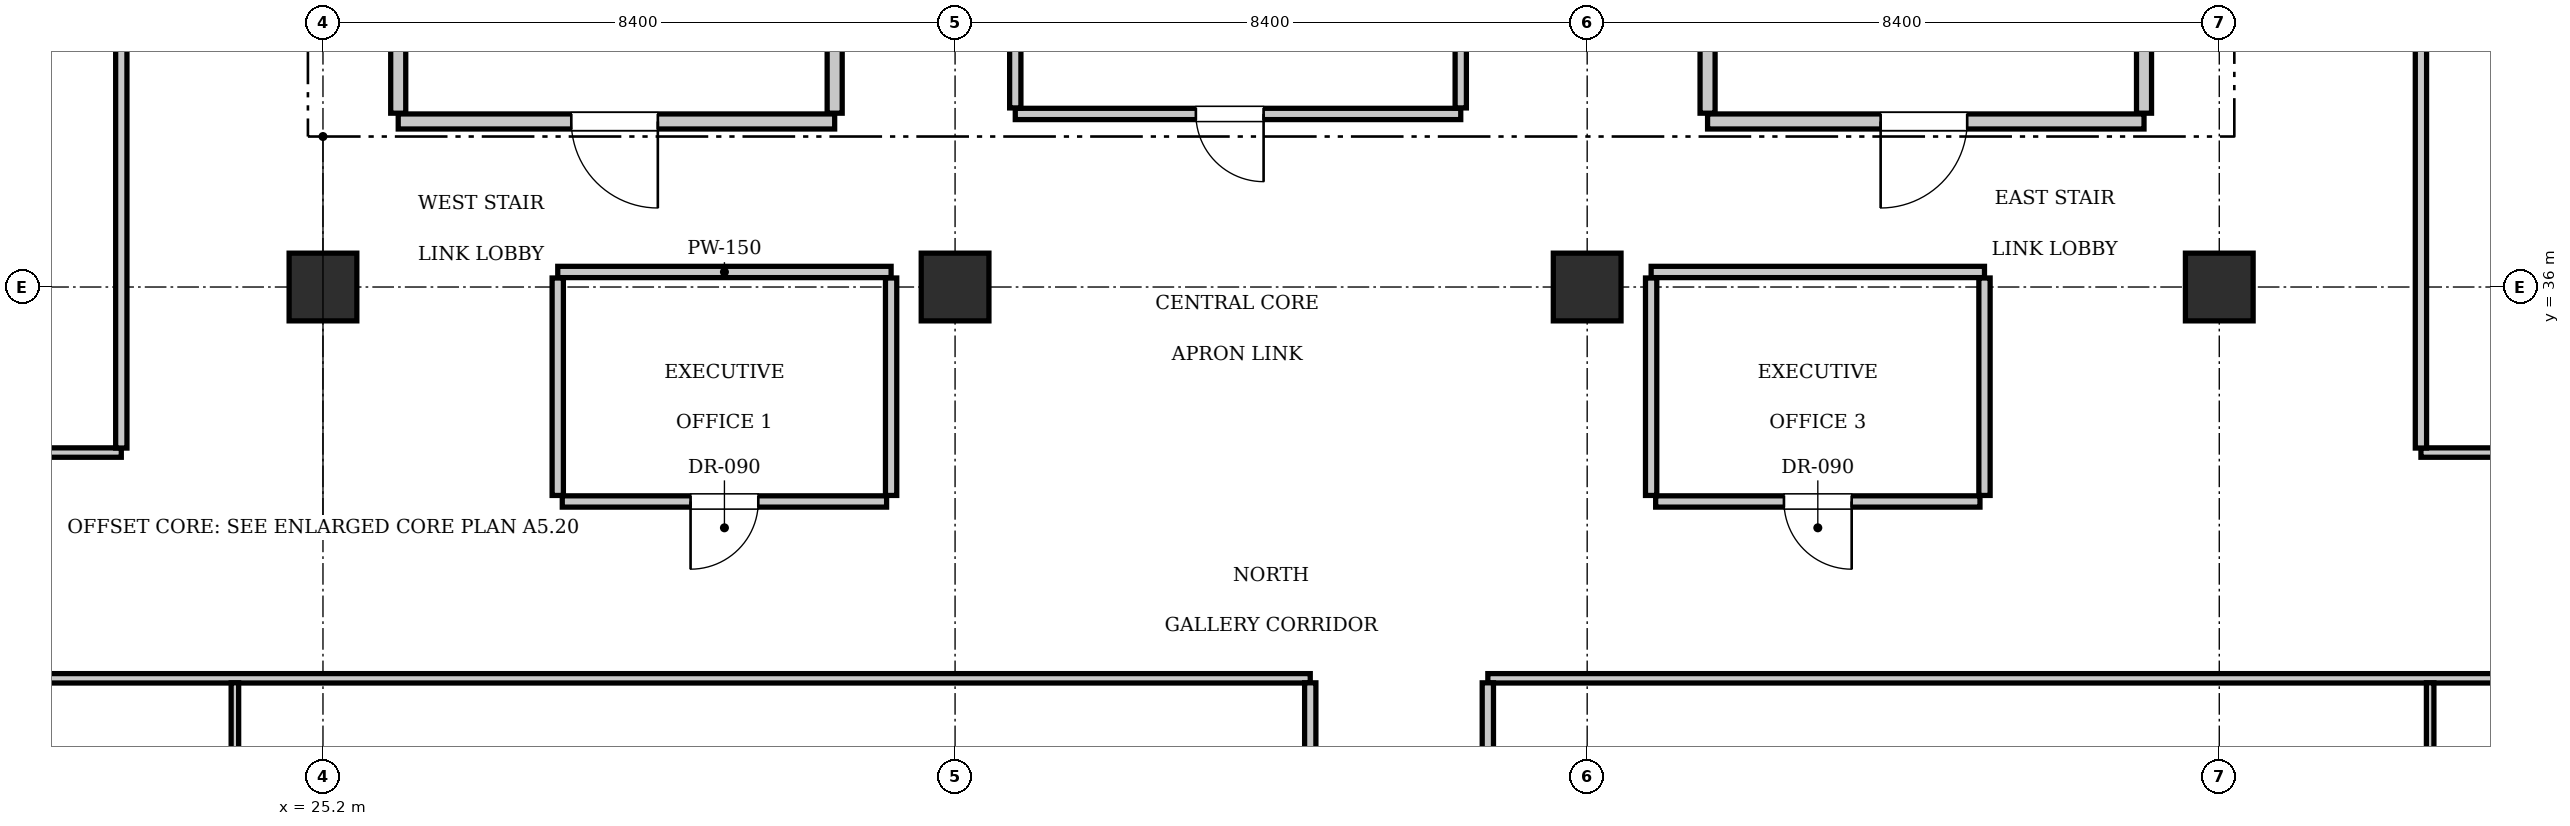
"""IFC4 building model, lengths in metres.
Left out: names, types, materials, properties, quantities, classifications, styles, units other than length and angle.
Written with IfcOpenShell. Run it as: python <this file> out.ifc"""

import sys

from ifc_helpers import new_model, si_unit, direction, frame, frame_2d, origin, origin_2d, place, context, subcontext, project, spatial, rectangle, extrude, element, fill, save


model = new_model("IFC4")
c1 = context("Model", 3, precision=1e-05, world=origin(), true_north=direction((0.0, 1.0)))
c2 = subcontext(c1, "Body", "Model", "MODEL_VIEW")
j1 = project(units=[si_unit("LENGTHUNIT", "METRE"), si_unit("PLANEANGLEUNIT", "RADIAN")], contexts=[c1])
p1 = place(None, origin())
s1 = spatial("IfcSite", under=j1, at=p1, CompositionType="ELEMENT")
p2 = place(p1, origin())
s2 = spatial("IfcBuilding", under=s1, at=p2, CompositionType="ELEMENT")
p3 = place(p2, frame((0.0, 0.0, 196.7)))
s3 = spatial("IfcBuildingStorey", under=s2, at=p3, CompositionType="ELEMENT", Elevation=196.7)
for number, where, z_axis, x_axis in (
    (1, (25.2, 36.0, 0.0), (0.0, 0.0, 1.0), (1.0, 0.0, 0.0)),
    (2, (33.6, 36.0, 0.0), (0.0, 0.0, 1.0), (1.0, 0.0, 0.0)),
    (3, (42.0, 36.0, 0.0), (0.0, 0.0, 1.0), (1.0, 0.0, 0.0)),
    (4, (50.4, 36.0, 0.0), (0.0, 0.0, 1.0), (1.0, 0.0, 0.0)),
):
    element("IfcColumn", number, at=place(p3, frame(where, z_axis=z_axis, x_axis=x_axis)), inside=s3, PredefinedType="COLUMN", context=c2, shape_type="SweptSolid", body=[
        extrude(rectangle(XDim=0.9, YDim=0.9, at=origin_2d()), origin(), (0.0, 0.0, 1.0), 3.85),
    ])
p4 = place(p3, frame((26.2, 38.2, 0.0), z_axis=(0.0, 0.0, 1.0), x_axis=(1.0, 0.0, 0.0)))
e5 = element("IfcWall", 5, at=p4, inside=s3, PredefinedType="PARTITIONING", context=c2, shape_type="SweptSolid", body=[
    extrude(rectangle(XDim=5.8, YDim=0.2, at=frame_2d((2.9, 0.0))), origin(), (0.0, 0.0, 1.0), 3.61),
])
p5 = place(p4, frame((2.3, 0.0, 0.0)))
e6 = element("IfcOpeningElement", 6, at=p5, cuts=e5, PredefinedType="OPENING", context=c2, shape_type="SweptSolid", body=[
    extrude(rectangle(XDim=1.15, YDim=2.15, at=frame_2d((0.575, 1.075))), frame((0.0, 0.11, 0.0), z_axis=(0.0, -1.0, 0.0), x_axis=(1.0, 0.0, 0.0)), (0.0, 0.0, 1.0), 0.22),
])
for number, where, z_axis, x_axis in (
    (7, (26.2, 38.31, 0.0), (0.0, 0.0, 1.0), (0.0, 1.0, 0.0)),
    (8, (32.0, 38.31, 0.0), (0.0, 0.0, 1.0), (0.0, 1.0, 0.0)),
):
    element("IfcWall", number, at=place(p3, frame(where, z_axis=z_axis, x_axis=x_axis)), inside=s3, PredefinedType="PARTITIONING", context=c2, shape_type="SweptSolid", body=[
        extrude(rectangle(XDim=3.07, YDim=0.2, at=frame_2d((1.535, 0.0))), origin(), (0.0, 0.0, 1.0), 3.61),
    ])
p6 = place(p3, frame((43.6, 38.2, 0.0), z_axis=(0.0, 0.0, 1.0), x_axis=(1.0, 0.0, 0.0)))
e9 = element("IfcWall", 9, at=p6, inside=s3, PredefinedType="PARTITIONING", context=c2, shape_type="SweptSolid", body=[
    extrude(rectangle(XDim=5.8, YDim=0.2, at=frame_2d((2.9, 0.0))), origin(), (0.0, 0.0, 1.0), 3.61),
])
p7 = place(p6, frame((2.3, 0.0, 0.0)))
e10 = element("IfcOpeningElement", 10, at=p7, cuts=e9, PredefinedType="OPENING", context=c2, shape_type="SweptSolid", body=[
    extrude(rectangle(XDim=1.15, YDim=2.15, at=frame_2d((0.575, 1.075))), frame((0.0, 0.11, 0.0), z_axis=(0.0, -1.0, 0.0), x_axis=(1.0, 0.0, 0.0)), (0.0, 0.0, 1.0), 0.22),
])
for number, where, z_axis, x_axis in (
    (11, (43.6, 38.31, 0.0), (0.0, 0.0, 1.0), (0.0, 1.0, 0.0)),
    (12, (49.4, 38.31, 0.0), (0.0, 0.0, 1.0), (0.0, 1.0, 0.0)),
):
    element("IfcWall", number, at=place(p3, frame(where, z_axis=z_axis, x_axis=x_axis)), inside=s3, PredefinedType="PARTITIONING", context=c2, shape_type="SweptSolid", body=[
        extrude(rectangle(XDim=3.07, YDim=0.2, at=frame_2d((1.535, 0.0))), origin(), (0.0, 0.0, 1.0), 3.61),
    ])
p8 = place(p3, frame((34.4, 38.3, 0.0), z_axis=(0.0, 0.0, 1.0), x_axis=(1.0, 0.0, 0.0)))
e13 = element("IfcWall", 13, at=p8, inside=s3, PredefinedType="PARTITIONING", context=c2, shape_type="SweptSolid", body=[
    extrude(rectangle(XDim=5.92, YDim=0.15, at=frame_2d((2.96, 0.0))), origin(), (0.0, 0.0, 1.0), 3.61),
])
p9 = place(p8, frame((2.4, 0.0, 0.0)))
e14 = element("IfcOpeningElement", 14, at=p9, cuts=e13, PredefinedType="OPENING", context=c2, shape_type="SweptSolid", body=[
    extrude(rectangle(XDim=0.9, YDim=2.1, at=frame_2d((0.45, 1.05))), frame((0.0, 0.085, 0.0), z_axis=(0.0, -1.0, 0.0), x_axis=(1.0, 0.0, 0.0)), (0.0, 0.0, 1.0), 0.17),
])
for number, where, z_axis, x_axis in (
    (15, (34.4, 38.38, 0.0), (0.0, 0.0, 1.0), (0.0, 1.0, 0.0)),
    (16, (40.32, 38.38, 0.0), (0.0, 0.0, 1.0), (0.0, 1.0, 0.0)),
):
    element("IfcWall", number, at=place(p3, frame(where, z_axis=z_axis, x_axis=x_axis)), inside=s3, PredefinedType="PARTITIONING", context=c2, shape_type="SweptSolid", body=[
        extrude(rectangle(XDim=2.84, YDim=0.15, at=frame_2d((1.42, 0.0))), origin(), (0.0, 0.0, 1.0), 3.61),
    ])
p10 = place(p3, frame((28.32, 36.2, 0.0), z_axis=(0.0, 0.0, 1.0), x_axis=(1.0, 0.0, 0.0)))
e17 = element("IfcWall", 17, at=p10, inside=s3, PredefinedType="PARTITIONING", context=c2, shape_type="SweptSolid", body=[
    extrude(rectangle(XDim=4.43, YDim=0.15, at=frame_2d((2.215, 0.0))), origin(), (0.0, 0.0, 1.0), 3.61),
])
for number, where, z_axis, x_axis in (
    (18, (28.32, 33.23, 0.0), (0.0, 0.0, 1.0), (0.0, 1.0, 0.0)),
    (19, (32.75, 33.23, 0.0), (0.0, 0.0, 1.0), (0.0, 1.0, 0.0)),
):
    element("IfcWall", number, at=place(p3, frame(where, z_axis=z_axis, x_axis=x_axis)), inside=s3, PredefinedType="PARTITIONING", context=c2, shape_type="SweptSolid", body=[
        extrude(rectangle(XDim=2.89, YDim=0.15, at=frame_2d((1.445, 0.0))), origin(), (0.0, 0.0, 1.0), 3.61),
    ])
p11 = place(p3, frame((28.38, 33.15, 0.0), z_axis=(0.0, 0.0, 1.0), x_axis=(1.0, 0.0, 0.0)))
e20 = element("IfcWall", 20, at=p11, inside=s3, PredefinedType="PARTITIONING", context=c2, shape_type="SweptSolid", body=[
    extrude(rectangle(XDim=4.31, YDim=0.15, at=frame_2d((2.155, 0.0))), origin(), (0.0, 0.0, 1.0), 3.61),
])
p12 = place(p11, frame((1.705, 0.0, 0.0)))
e21 = element("IfcOpeningElement", 21, at=p12, cuts=e20, PredefinedType="OPENING", context=c2, shape_type="SweptSolid", body=[
    extrude(rectangle(XDim=0.9, YDim=2.1, at=frame_2d((0.45, 1.05))), frame((0.0, 0.085, 0.0), z_axis=(0.0, -1.0, 0.0), x_axis=(1.0, 0.0, 0.0)), (0.0, 0.0, 1.0), 0.17),
])
p13 = place(p3, frame((42.85, 36.2, 0.0), z_axis=(0.0, 0.0, 1.0), x_axis=(1.0, 0.0, 0.0)))
e22 = element("IfcWall", 22, at=p13, inside=s3, PredefinedType="PARTITIONING", context=c2, shape_type="SweptSolid", body=[
    extrude(rectangle(XDim=4.43, YDim=0.15, at=frame_2d((2.215, 0.0))), origin(), (0.0, 0.0, 1.0), 3.61),
])
for number, where, z_axis, x_axis in (
    (23, (42.85, 33.23, 0.0), (0.0, 0.0, 1.0), (0.0, 1.0, 0.0)),
    (24, (47.28, 33.23, 0.0), (0.0, 0.0, 1.0), (0.0, 1.0, 0.0)),
):
    element("IfcWall", number, at=place(p3, frame(where, z_axis=z_axis, x_axis=x_axis)), inside=s3, PredefinedType="PARTITIONING", context=c2, shape_type="SweptSolid", body=[
        extrude(rectangle(XDim=2.89, YDim=0.15, at=frame_2d((1.445, 0.0))), origin(), (0.0, 0.0, 1.0), 3.61),
    ])
p14 = place(p3, frame((42.91, 33.15, 0.0), z_axis=(0.0, 0.0, 1.0), x_axis=(1.0, 0.0, 0.0)))
e25 = element("IfcWall", 25, at=p14, inside=s3, PredefinedType="PARTITIONING", context=c2, shape_type="SweptSolid", body=[
    extrude(rectangle(XDim=4.31, YDim=0.15, at=frame_2d((2.155, 0.0))), origin(), (0.0, 0.0, 1.0), 3.61),
])
p15 = place(p14, frame((1.705, 0.0, 0.0)))
e26 = element("IfcOpeningElement", 26, at=p15, cuts=e25, PredefinedType="OPENING", context=c2, shape_type="SweptSolid", body=[
    extrude(rectangle(XDim=0.9, YDim=2.1, at=frame_2d((0.45, 1.05))), frame((0.0, 0.085, 0.0), z_axis=(0.0, -1.0, 0.0), x_axis=(1.0, 0.0, 0.0)), (0.0, 0.0, 1.0), 0.17),
])
p16 = place(p3, frame((13.2, 30.8, 0.0), z_axis=(0.0, 0.0, 1.0), x_axis=(1.0, 0.0, 0.0)))
e27 = element("IfcWall", 27, at=p16, inside=s3, PredefinedType="PARTITIONING", context=c2, shape_type="SweptSolid", body=[
    extrude(rectangle(XDim=25.12, YDim=0.125, at=frame_2d((12.56, 0.0))), origin(), (0.0, 0.0, 1.0), 3.61),
])
p17 = place(p3, frame((40.68, 30.8, 0.0), z_axis=(0.0, 0.0, 1.0), x_axis=(1.0, 0.0, 0.0)))
e28 = element("IfcWall", 28, at=p17, inside=s3, PredefinedType="PARTITIONING", context=c2, shape_type="SweptSolid", body=[
    extrude(rectangle(XDim=21.72, YDim=0.125, at=frame_2d((10.86, 0.0))), origin(), (0.0, 0.0, 1.0), 3.61),
])
p18 = place(p3, frame((38.32, 25.6, 0.0), z_axis=(0.0, 0.0, 1.0), x_axis=(0.0, 1.0, 0.0)))
e29 = element("IfcWall", 29, at=p18, inside=s3, PredefinedType="PARTITIONING", context=c2, shape_type="SweptSolid", body=[
    extrude(rectangle(XDim=5.14, YDim=0.15, at=frame_2d((2.57, 0.0))), origin(), (0.0, 0.0, 1.0), 3.61),
])
p19 = place(p18, frame((2.095, 0.0, 0.0)))
e30 = element("IfcOpeningElement", 30, at=p19, cuts=e29, PredefinedType="OPENING", context=c2, shape_type="SweptSolid", body=[
    extrude(rectangle(XDim=0.95, YDim=2.15, at=frame_2d((0.475, 1.075))), frame((0.0, 0.085, 0.0), z_axis=(0.0, -1.0, 0.0), x_axis=(1.0, 0.0, 0.0)), (0.0, 0.0, 1.0), 0.17),
])
p20 = place(p3, frame((24.03, 23.31, 0.0), z_axis=(0.0, 0.0, 1.0), x_axis=(0.0, 1.0, 0.0)))
e31 = element("IfcWall", 31, at=p20, inside=s3, PredefinedType="PARTITIONING", context=c2, shape_type="SweptSolid", body=[
    extrude(rectangle(XDim=7.43, YDim=0.1, at=frame_2d((3.715, 0.0))), origin(), (0.0, 0.0, 1.0), 3.61),
])
p21 = place(p20, frame((4.945, 0.0, 0.0)))
e32 = element("IfcOpeningElement", 32, at=p21, cuts=e31, PredefinedType="OPENING", context=c2, shape_type="SweptSolid", body=[
    extrude(rectangle(XDim=0.9, YDim=2.1, at=frame_2d((0.45, 1.05))), frame((0.0, 0.06, 0.0), z_axis=(0.0, -1.0, 0.0), x_axis=(1.0, 0.0, 0.0)), (0.0, 0.0, 1.0), 0.12),
])
p22 = place(p3, frame((40.68, 25.6, 0.0), z_axis=(0.0, 0.0, 1.0), x_axis=(0.0, 1.0, 0.0)))
e33 = element("IfcWall", 33, at=p22, inside=s3, PredefinedType="PARTITIONING", context=c2, shape_type="SweptSolid", body=[
    extrude(rectangle(XDim=5.14, YDim=0.15, at=frame_2d((2.57, 0.0))), origin(), (0.0, 0.0, 1.0), 3.61),
])
p23 = place(p22, frame((2.095, 0.0, 0.0)))
e34 = element("IfcOpeningElement", 34, at=p23, cuts=e33, PredefinedType="OPENING", context=c2, shape_type="SweptSolid", body=[
    extrude(rectangle(XDim=0.95, YDim=2.15, at=frame_2d((0.475, 1.075))), frame((0.0, 0.085, 0.0), z_axis=(0.0, -1.0, 0.0), x_axis=(1.0, 0.0, 0.0)), (0.0, 0.0, 1.0), 0.17),
])
p24 = place(p3, frame((53.202, 23.31, 0.0), z_axis=(0.0, 0.0, 1.0), x_axis=(0.0, 1.0, 0.0)))
e35 = element("IfcWall", 35, at=p24, inside=s3, PredefinedType="PARTITIONING", context=c2, shape_type="SweptSolid", body=[
    extrude(rectangle(XDim=7.43, YDim=0.1, at=frame_2d((3.715, 0.0))), origin(), (0.0, 0.0, 1.0), 3.61),
])
p25 = place(p24, frame((3.265, 0.0, 0.0)))
e36 = element("IfcOpeningElement", 36, at=p25, cuts=e35, PredefinedType="OPENING", context=c2, shape_type="SweptSolid", body=[
    extrude(rectangle(XDim=0.9, YDim=2.1, at=frame_2d((0.45, 1.05))), frame((0.0, 0.06, 0.0), z_axis=(0.0, -1.0, 0.0), x_axis=(1.0, 0.0, 0.0)), (0.0, 0.0, 1.0), 0.12),
])
p26 = place(p3, frame((13.2, 33.8, 0.0), z_axis=(0.0, 0.0, 1.0), x_axis=(1.0, 0.0, 0.0)))
e37 = element("IfcWall", 37, at=p26, inside=s3, PredefinedType="PARTITIONING", context=c2, shape_type="SweptSolid", body=[
    extrude(rectangle(XDim=9.32, YDim=0.125, at=frame_2d((4.66, 0.0))), origin(), (0.0, 0.0, 1.0), 3.61),
])
p27 = place(p3, frame((53.08, 33.8, 0.0), z_axis=(0.0, 0.0, 1.0), x_axis=(1.0, 0.0, 0.0)))
e38 = element("IfcWall", 38, at=p27, inside=s3, PredefinedType="PARTITIONING", context=c2, shape_type="SweptSolid", body=[
    extrude(rectangle(XDim=9.32, YDim=0.125, at=frame_2d((4.66, 0.0))), origin(), (0.0, 0.0, 1.0), 3.61),
])
p28 = place(p3, frame((22.52, 33.86, 0.0), z_axis=(0.0, 0.0, 1.0), x_axis=(0.0, 1.0, 0.0)))
e39 = element("IfcWall", 39, at=p28, inside=s3, PredefinedType="PARTITIONING", context=c2, shape_type="SweptSolid", body=[
    extrude(rectangle(XDim=13.327, YDim=0.15, at=frame_2d((6.664, 0.0))), origin(), (0.0, 0.0, 1.0), 3.61),
])
p29 = place(p28, frame((6.189, 0.0, 0.0)))
e40 = element("IfcOpeningElement", 40, at=p29, cuts=e39, PredefinedType="OPENING", context=c2, shape_type="SweptSolid", body=[
    extrude(rectangle(XDim=0.95, YDim=2.15, at=frame_2d((0.475, 1.075))), frame((0.0, 0.085, 0.0), z_axis=(0.0, -1.0, 0.0), x_axis=(1.0, 0.0, 0.0)), (0.0, 0.0, 1.0), 0.17),
])
p30 = place(p3, frame((53.08, 33.86, 0.0), z_axis=(0.0, 0.0, 1.0), x_axis=(0.0, 1.0, 0.0)))
e41 = element("IfcWall", 41, at=p30, inside=s3, PredefinedType="PARTITIONING", context=c2, shape_type="SweptSolid", body=[
    extrude(rectangle(XDim=13.327, YDim=0.15, at=frame_2d((6.664, 0.0))), origin(), (0.0, 0.0, 1.0), 3.61),
])
p31 = place(p30, frame((6.189, 0.0, 0.0)))
e42 = element("IfcOpeningElement", 42, at=p31, cuts=e41, PredefinedType="OPENING", context=c2, shape_type="SweptSolid", body=[
    extrude(rectangle(XDim=0.95, YDim=2.15, at=frame_2d((0.475, 1.075))), frame((0.0, 0.085, 0.0), z_axis=(0.0, -1.0, 0.0), x_axis=(1.0, 0.0, 0.0)), (0.0, 0.0, 1.0), 0.17),
])
p32 = place(p5, frame((1.15, 0.0, 0.0), z_axis=(0.0, 0.0, 1.0), x_axis=(-1.0, 0.0, 0.0)))
e43 = element("IfcDoor", 43, at=p32, inside=s3, OperationType="SINGLE_SWING_LEFT", PredefinedType="DOOR", context=c2, shape_type="SweptSolid", body=[
    extrude(rectangle(XDim=1.15, YDim=2.15, at=frame_2d((0.575, 1.075))), frame((0.0, 0.025, 0.0), z_axis=(0.0, -1.0, 0.0), x_axis=(1.0, 0.0, 0.0)), (0.0, 0.0, 1.0), 0.05),
])
fill(e6, e43)
p33 = place(p7, frame((1.15, 0.0, 0.0), z_axis=(0.0, 0.0, 1.0), x_axis=(-1.0, 0.0, 0.0)))
e44 = element("IfcDoor", 44, at=p33, inside=s3, OperationType="SINGLE_SWING_RIGHT", PredefinedType="DOOR", context=c2, shape_type="SweptSolid", body=[
    extrude(rectangle(XDim=1.15, YDim=2.15, at=frame_2d((0.575, 1.075))), frame((0.0, 0.025, 0.0), z_axis=(0.0, -1.0, 0.0), x_axis=(1.0, 0.0, 0.0)), (0.0, 0.0, 1.0), 0.05),
])
fill(e10, e44)
p34 = place(p9, frame((0.9, 0.0, 0.0), z_axis=(0.0, 0.0, 1.0), x_axis=(-1.0, 0.0, 0.0)))
e45 = element("IfcDoor", 45, at=p34, inside=s3, OperationType="SINGLE_SWING_LEFT", PredefinedType="DOOR", context=c2, shape_type="SweptSolid", body=[
    extrude(rectangle(XDim=0.9, YDim=2.1, at=frame_2d((0.45, 1.05))), frame((0.0, 0.025, 0.0), z_axis=(0.0, -1.0, 0.0), x_axis=(1.0, 0.0, 0.0)), (0.0, 0.0, 1.0), 0.05),
])
fill(e14, e45)
p35 = place(p12, frame((0.9, 0.0, 0.0), z_axis=(0.0, 0.0, 1.0), x_axis=(-1.0, 0.0, 0.0)))
e46 = element("IfcDoor", 46, at=p35, inside=s3, OperationType="SINGLE_SWING_RIGHT", PredefinedType="DOOR", context=c2, shape_type="SweptSolid", body=[
    extrude(rectangle(XDim=0.9, YDim=2.1, at=frame_2d((0.45, 1.05))), frame((0.0, 0.025, 0.0), z_axis=(0.0, -1.0, 0.0), x_axis=(1.0, 0.0, 0.0)), (0.0, 0.0, 1.0), 0.05),
])
fill(e21, e46)
p36 = place(p15, frame((0.9, 0.0, 0.0), z_axis=(0.0, 0.0, 1.0), x_axis=(-1.0, 0.0, 0.0)))
e47 = element("IfcDoor", 47, at=p36, inside=s3, OperationType="SINGLE_SWING_LEFT", PredefinedType="DOOR", context=c2, shape_type="SweptSolid", body=[
    extrude(rectangle(XDim=0.9, YDim=2.1, at=frame_2d((0.45, 1.05))), frame((0.0, 0.025, 0.0), z_axis=(0.0, -1.0, 0.0), x_axis=(1.0, 0.0, 0.0)), (0.0, 0.0, 1.0), 0.05),
])
fill(e26, e47)
save(model, sys.argv[1])
